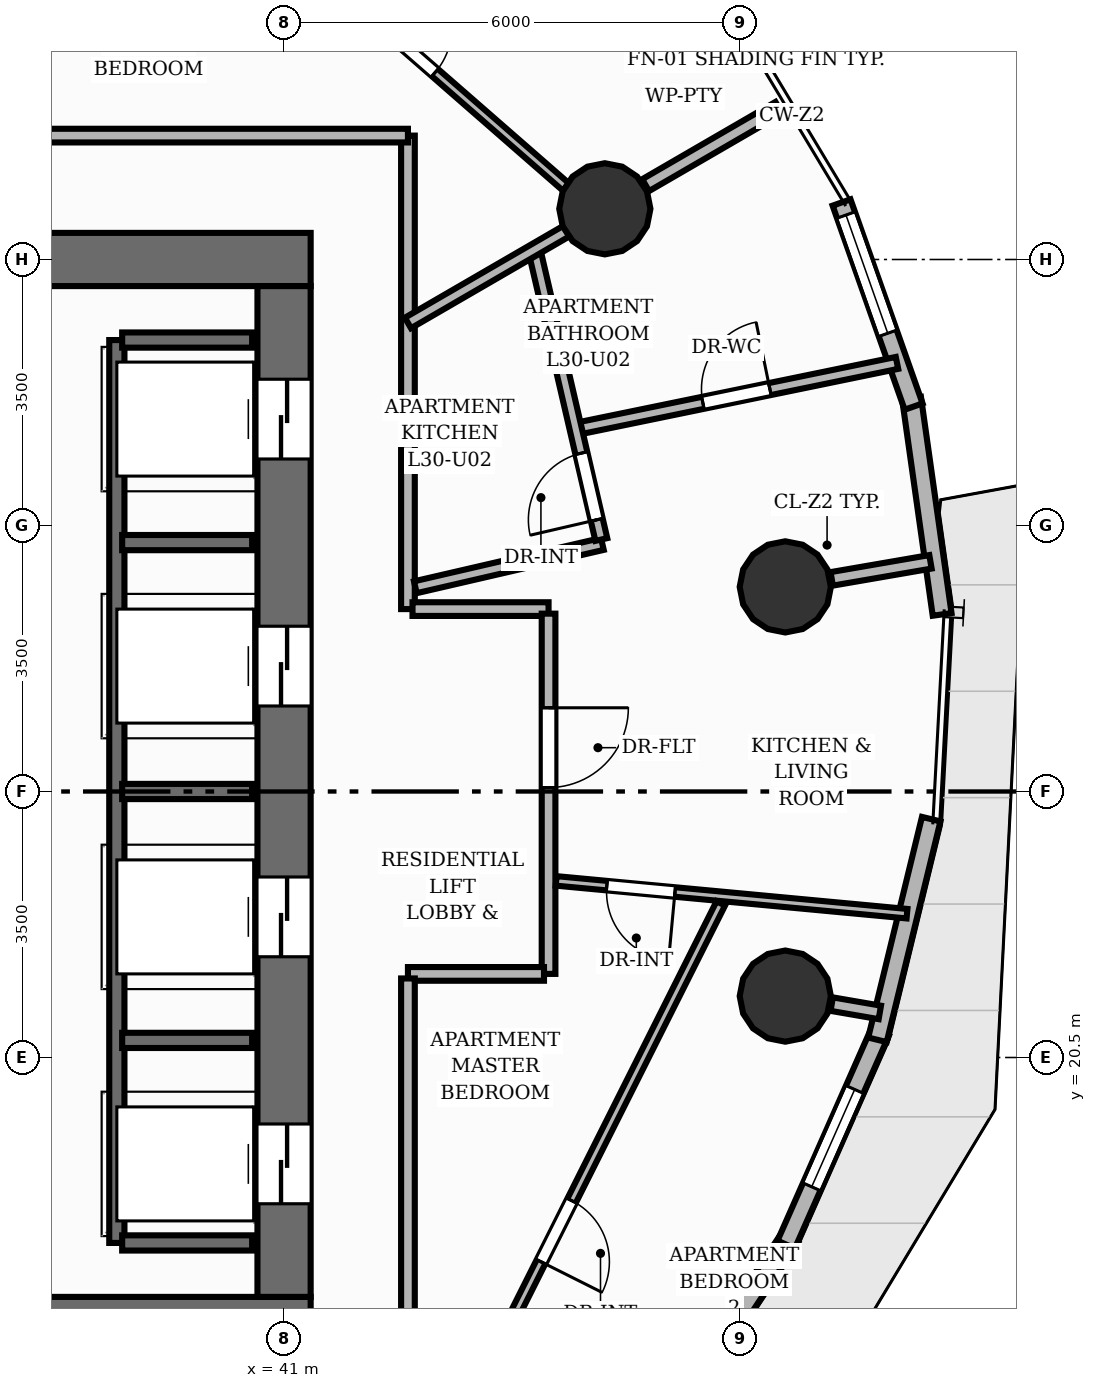
"""IFC4 building model, lengths in metres.
Left out: names, types, materials, properties, quantities, classifications, styles, units other than length and angle.
Written with IfcOpenShell. Run it as: python <this file> out.ifc"""

import sys

from ifc_helpers import new_model, si_unit, direction, frame, frame_2d, origin, origin_2d, place, context, subcontext, project, spatial, rectangle, circle, extrude, element, fill, save


model = new_model("IFC4")
c1 = context("Model", 3, precision=1e-05, world=origin(), true_north=direction((0.0, 1.0)))
c2 = subcontext(c1, "Body", "Model", "MODEL_VIEW")
j1 = project(units=[si_unit("LENGTHUNIT", "METRE"), si_unit("PLANEANGLEUNIT", "RADIAN")], contexts=[c1])
p1 = place(None, origin())
s1 = spatial("IfcSite", under=j1, at=p1, CompositionType="ELEMENT")
p2 = place(p1, origin())
s2 = spatial("IfcBuilding", under=s1, at=p2, CompositionType="ELEMENT")
p3 = place(p2, frame((0.0, 0.0, 102.88)))
s3 = spatial("IfcBuildingStorey", under=s2, at=p3, CompositionType="ELEMENT", Elevation=102.88)
p4 = place(p3, frame((22.65, 17.0, 0.0), z_axis=(0.0, 0.0, 1.0), x_axis=(1.0, 0.0, 0.0)))
e1 = element("IfcWall", 1, at=p4, inside=s3, PredefinedType="SHEAR", context=c2, shape_type="SweptSolid", body=[
    extrude(rectangle(XDim=18.7, YDim=0.7, at=frame_2d((9.35, 0.0))), origin(), (0.0, 0.0, 1.0), 3.2),
])
p5 = place(p4, frame((5.85, 0.0, 0.0)))
e2 = element("IfcOpeningElement", 2, at=p5, cuts=e1, PredefinedType="OPENING", context=c2, shape_type="SweptSolid", body=[
    extrude(rectangle(XDim=1.1, YDim=2.15, at=frame_2d((0.55, 1.075))), frame((0.0, 0.36, 0.0), z_axis=(0.0, -1.0, 0.0), x_axis=(1.0, 0.0, 0.0)), (0.0, 0.0, 1.0), 0.72),
])
p6 = place(p4, frame((9.4, 0.0, 0.0)))
e3 = element("IfcOpeningElement", 3, at=p6, cuts=e1, PredefinedType="OPENING", context=c2, shape_type="SweptSolid", body=[
    extrude(rectangle(XDim=0.9, YDim=2.1, at=frame_2d((0.45, 1.05))), frame((0.0, 0.36, 0.0), z_axis=(0.0, -1.0, 0.0), x_axis=(1.0, 0.0, 0.0)), (0.0, 0.0, 1.0), 0.72),
])
p7 = place(p3, frame((22.65, 31.0, 0.0), z_axis=(0.0, 0.0, 1.0), x_axis=(1.0, 0.0, 0.0)))
e4 = element("IfcWall", 4, at=p7, inside=s3, PredefinedType="SHEAR", context=c2, shape_type="SweptSolid", body=[
    extrude(rectangle(XDim=18.7, YDim=0.7, at=frame_2d((9.35, 0.0))), origin(), (0.0, 0.0, 1.0), 3.2),
])
p8 = place(p7, frame((11.75, 0.0, 0.0)))
e5 = element("IfcOpeningElement", 5, at=p8, cuts=e4, PredefinedType="OPENING", context=c2, shape_type="SweptSolid", body=[
    extrude(rectangle(XDim=1.1, YDim=2.15, at=frame_2d((0.55, 1.075))), frame((0.0, 0.36, 0.0), z_axis=(0.0, -1.0, 0.0), x_axis=(1.0, 0.0, 0.0)), (0.0, 0.0, 1.0), 0.72),
])
p9 = place(p3, frame((41.0, 17.35, 0.0), z_axis=(0.0, 0.0, 1.0), x_axis=(0.0, 1.0, 0.0)))
e6 = element("IfcWall", 6, at=p9, inside=s3, PredefinedType="SHEAR", context=c2, shape_type="SweptSolid", body=[
    extrude(rectangle(XDim=13.3, YDim=0.7, at=frame_2d((6.65, 0.0))), origin(), (0.0, 0.0, 1.0), 3.2),
])
p10 = place(p9, frame((1.225, 0.0, 0.0)))
e7 = element("IfcOpeningElement", 7, at=p10, cuts=e6, PredefinedType="OPENING", context=c2, shape_type="SweptSolid", body=[
    extrude(rectangle(XDim=1.05, YDim=2.15, at=frame_2d((0.525, 1.075))), frame((0.0, 0.36, 0.0), z_axis=(0.0, -1.0, 0.0), x_axis=(1.0, 0.0, 0.0)), (0.0, 0.0, 1.0), 0.72),
])
p11 = place(p9, frame((4.475, 0.0, 0.0)))
e8 = element("IfcOpeningElement", 8, at=p11, cuts=e6, PredefinedType="OPENING", context=c2, shape_type="SweptSolid", body=[
    extrude(rectangle(XDim=1.05, YDim=2.15, at=frame_2d((0.525, 1.075))), frame((0.0, 0.36, 0.0), z_axis=(0.0, -1.0, 0.0), x_axis=(1.0, 0.0, 0.0)), (0.0, 0.0, 1.0), 0.72),
])
p12 = place(p9, frame((7.775, 0.0, 0.0)))
e9 = element("IfcOpeningElement", 9, at=p12, cuts=e6, PredefinedType="OPENING", context=c2, shape_type="SweptSolid", body=[
    extrude(rectangle(XDim=1.05, YDim=2.15, at=frame_2d((0.525, 1.075))), frame((0.0, 0.36, 0.0), z_axis=(0.0, -1.0, 0.0), x_axis=(1.0, 0.0, 0.0)), (0.0, 0.0, 1.0), 0.72),
])
p13 = place(p9, frame((11.025, 0.0, 0.0)))
e10 = element("IfcOpeningElement", 10, at=p13, cuts=e6, PredefinedType="OPENING", context=c2, shape_type="SweptSolid", body=[
    extrude(rectangle(XDim=1.05, YDim=2.15, at=frame_2d((0.525, 1.075))), frame((0.0, 0.36, 0.0), z_axis=(0.0, -1.0, 0.0), x_axis=(1.0, 0.0, 0.0)), (0.0, 0.0, 1.0), 0.72),
])
for number, where, z_axis, x_axis in (
    (11, (47.594, 26.692, 0.0), (0.0, 0.0, 1.0), (1.0, 0.0, 0.0)),
    (12, (45.22, 31.667, 0.0), (0.0, 0.0, 1.0), (1.0, 0.0, 0.0)),
    (13, (47.594, 21.308, 0.0), (0.0, 0.0, 1.0), (1.0, 0.0, 0.0)),
):
    element("IfcColumn", number, at=place(p3, frame(where, z_axis=z_axis, x_axis=x_axis)), inside=s3, PredefinedType="COLUMN", context=c2, shape_type="SweptSolid", body=[
        extrude(circle(Radius=0.6, at=origin_2d()), origin(), (0.0, 0.0, 1.0), 3.2),
    ])
p14 = place(p3, frame((47.659, 18.136, 0.0), z_axis=(0.0, 0.0, 1.0), x_axis=(-0.552034347266, -0.833821371421, 0.0)))
e14 = element("IfcWall", 14, at=p14, inside=s3, PredefinedType="SOLIDWALL", context=c2, shape_type="SweptSolid", body=[
    extrude(rectangle(XDim=3.131, YDim=0.25, at=frame_2d((1.565, 0.0))), origin(), (0.0, 0.0, 1.0), 2.96),
])
p15 = place(p3, frame((48.843, 20.838, 0.0), z_axis=(0.0, 0.0, 1.0), x_axis=(-0.404109525311, -0.914710605357, 0.0)))
e15 = element("IfcWall", 15, at=p15, inside=s3, PredefinedType="SOLIDWALL", context=c2, shape_type="SweptSolid", body=[
    extrude(rectangle(XDim=3.061, YDim=0.25, at=frame_2d((1.53, 0.0))), origin(), (0.0, 0.0, 1.0), 2.96),
])
p16 = place(p15, frame((0.83, 0.0, 0.85)))
e16 = element("IfcOpeningElement", 16, at=p16, cuts=e15, PredefinedType="OPENING", context=c2, shape_type="SweptSolid", body=[
    extrude(rectangle(XDim=1.4, YDim=1.55, at=frame_2d((0.7, 0.775))), frame((0.0, 0.135, 0.0), z_axis=(0.0, -1.0, 0.0), x_axis=(1.0, 0.0, 0.0)), (0.0, 0.0, 1.0), 0.27),
])
p17 = place(p3, frame((49.514, 23.636, 0.0), z_axis=(0.0, 0.0, 1.0), x_axis=(-0.236668427837, -0.971590477138, 0.0)))
e17 = element("IfcWall", 17, at=p17, inside=s3, PredefinedType="SOLIDWALL", context=c2, shape_type="SweptSolid", body=[
    extrude(rectangle(XDim=2.989, YDim=0.25, at=frame_2d((1.494, 0.0))), origin(), (0.0, 0.0, 1.0), 2.96),
])
p18 = place(p3, frame((49.256, 29.176, 0.0), z_axis=(0.0, 0.0, 1.0), x_axis=(0.139982311006, -0.990154004489, 0.0)))
e18 = element("IfcWall", 18, at=p18, inside=s3, PredefinedType="SOLIDWALL", context=c2, shape_type="SweptSolid", body=[
    extrude(rectangle(XDim=2.874, YDim=0.25, at=frame_2d((1.437, 0.0))), origin(), (0.0, 0.0, 1.0), 2.96),
])
p19 = place(p3, frame((48.335, 31.75, 0.0), z_axis=(0.0, 0.0, 1.0), x_axis=(0.332923265962, -0.942953921982, 0.0)))
e19 = element("IfcWall", 19, at=p19, inside=s3, PredefinedType="SOLIDWALL", context=c2, shape_type="SweptSolid", body=[
    extrude(rectangle(XDim=2.847, YDim=0.25, at=frame_2d((1.424, 0.0))), origin(), (0.0, 0.0, 1.0), 2.96),
])
p20 = place(p19, frame((0.175, 0.0, 0.85)))
e20 = element("IfcOpeningElement", 20, at=p20, cuts=e19, PredefinedType="OPENING", context=c2, shape_type="SweptSolid", body=[
    extrude(rectangle(XDim=1.65, YDim=1.55, at=frame_2d((0.825, 0.775))), frame((0.0, 0.135, 0.0), z_axis=(0.0, -1.0, 0.0), x_axis=(1.0, 0.0, 0.0)), (0.0, 0.0, 1.0), 0.27),
])
p21 = place(p3, frame((38.8, 18.06, 0.0), z_axis=(0.0, 0.0, 1.0), x_axis=(0.0, 1.0, 0.0)))
e21 = element("IfcWall", 21, at=p21, inside=s3, PredefinedType="SHEAR", context=c2, shape_type="SweptSolid", body=[
    extrude(rectangle(XDim=11.88, YDim=0.2, at=frame_2d((5.94, 0.0))), origin(), (0.0, 0.0, 1.0), 3.2),
])
for number, where, z_axis, x_axis in (
    (22, (38.87, 18.06, 0.0), (0.0, 0.0, 1.0), (1.0, 0.0, 0.0)),
    (23, (38.87, 29.94, 0.0), (0.0, 0.0, 1.0), (1.0, 0.0, 0.0)),
    (24, (38.87, 20.725, 0.0), (0.0, 0.0, 1.0), (1.0, 0.0, 0.0)),
    (25, (38.87, 24.0, 0.0), (0.0, 0.0, 1.0), (1.0, 0.0, 0.0)),
    (26, (38.87, 27.275, 0.0), (0.0, 0.0, 1.0), (1.0, 0.0, 0.0)),
):
    element("IfcWall", number, at=place(p3, frame(where, z_axis=z_axis, x_axis=x_axis)), inside=s3, PredefinedType="SHEAR", context=c2, shape_type="SweptSolid", body=[
        extrude(rectangle(XDim=1.71, YDim=0.2, at=frame_2d((0.855, 0.0))), origin(), (0.0, 0.0, 1.0), 3.2),
    ])
p22 = place(p3, frame((48.206, 26.798, 0.0), z_axis=(0.0, 0.0, 1.0), x_axis=(0.98541625201, 0.170161130326, 0.0)))
e27 = element("IfcWall", 27, at=p22, inside=s3, PredefinedType="PARTITIONING", context=c2, shape_type="SweptSolid", body=[
    extrude(rectangle(XDim=1.319, YDim=0.18, at=frame_2d((0.659, 0.0))), origin(), (0.0, 0.0, 1.0), 2.261),
])
p23 = place(p3, frame((45.757, 31.978, 0.0), z_axis=(0.0, 0.0, 1.0), x_axis=(0.865046864493, 0.501691062539, 0.0)))
e28 = element("IfcWall", 28, at=p23, inside=s3, PredefinedType="PARTITIONING", context=c2, shape_type="SweptSolid", body=[
    extrude(rectangle(XDim=2.028, YDim=0.18, at=frame_2d((1.014, 0.0))), origin(), (0.0, 0.0, 1.0), 2.261),
])
p24 = place(p3, frame((48.206, 21.202, 0.0), z_axis=(0.0, 0.0, 1.0), x_axis=(0.985389793052, -0.170314285219, 0.0)))
e29 = element("IfcWall", 29, at=p24, inside=s3, PredefinedType="PARTITIONING", context=c2, shape_type="SweptSolid", body=[
    extrude(rectangle(XDim=0.642, YDim=0.18, at=frame_2d((0.321, 0.0))), origin(), (0.0, 0.0, 1.0), 2.261),
])
p25 = place(p3, frame((42.63, 32.63, 0.0), z_axis=(0.0, 0.0, 1.0), x_axis=(0.0, -1.0, 0.0)))
e30 = element("IfcWall", 30, at=p25, inside=s3, PredefinedType="PARTITIONING", context=c2, shape_type="SweptSolid", body=[
    extrude(rectangle(XDim=6.23, YDim=0.18, at=frame_2d((3.115, 0.0))), origin(), (0.0, 0.0, 1.0), 2.955),
])
p26 = place(p3, frame((42.69, 26.4, 0.0), z_axis=(0.0, 0.0, 1.0), x_axis=(1.0, 0.0, 0.0)))
e31 = element("IfcWall", 31, at=p26, inside=s3, PredefinedType="PARTITIONING", context=c2, shape_type="SweptSolid", body=[
    extrude(rectangle(XDim=1.79, YDim=0.18, at=frame_2d((0.895, 0.0))), origin(), (0.0, 0.0, 1.0), 2.261),
])
p27 = place(p3, frame((44.48, 26.34, 0.0), z_axis=(0.0, 0.0, 1.0), x_axis=(0.0, -1.0, 0.0)))
e32 = element("IfcWall", 32, at=p27, inside=s3, PredefinedType="PARTITIONING", context=c2, shape_type="SweptSolid", body=[
    extrude(rectangle(XDim=4.74, YDim=0.18, at=frame_2d((2.37, 0.0))), origin(), (0.0, 0.0, 1.0), 2.955),
])
p28 = place(p27, frame((1.239, 0.0, 0.0)))
e33 = element("IfcOpeningElement", 33, at=p28, cuts=e32, PredefinedType="OPENING", context=c2, shape_type="SweptSolid", body=[
    extrude(rectangle(XDim=1.05, YDim=2.15, at=frame_2d((0.525, 1.075))), frame((0.0, 0.1, 0.0), z_axis=(0.0, -1.0, 0.0), x_axis=(1.0, 0.0, 0.0)), (0.0, 0.0, 1.0), 0.2),
])
p29 = place(p3, frame((44.42, 21.6, 0.0), z_axis=(0.0, 0.0, 1.0), x_axis=(-1.0, 0.0, 0.0)))
e34 = element("IfcWall", 34, at=p29, inside=s3, PredefinedType="PARTITIONING", context=c2, shape_type="SweptSolid", body=[
    extrude(rectangle(XDim=1.79, YDim=0.18, at=frame_2d((0.895, 0.0))), origin(), (0.0, 0.0, 1.0), 2.261),
])
p30 = place(p3, frame((42.63, 21.54, 0.0), z_axis=(0.0, 0.0, 1.0), x_axis=(0.0, -1.0, 0.0)))
e35 = element("IfcWall", 35, at=p30, inside=s3, PredefinedType="PARTITIONING", context=c2, shape_type="SweptSolid", body=[
    extrude(rectangle(XDim=6.17, YDim=0.18, at=frame_2d((3.085, 0.0))), origin(), (0.0, 0.0, 1.0), 2.955),
])
p31 = place(p3, frame((22.734, 32.63, 0.0), z_axis=(0.0, 0.0, 1.0), x_axis=(1.0, 0.0, 0.0)))
e36 = element("IfcWall", 36, at=p31, inside=s3, PredefinedType="PARTITIONING", context=c2, shape_type="SweptSolid", body=[
    extrude(rectangle(XDim=19.896, YDim=0.18, at=frame_2d((9.948, 0.0))), origin(), (0.0, 0.0, 1.0), 2.955),
])
p32 = place(p31, frame((11.004, 0.0, 0.0)))
e37 = element("IfcOpeningElement", 37, at=p32, cuts=e36, PredefinedType="OPENING", context=c2, shape_type="SweptSolid", body=[
    extrude(rectangle(XDim=1.05, YDim=2.15, at=frame_2d((0.525, 1.075))), frame((0.0, 0.1, 0.0), z_axis=(0.0, -1.0, 0.0), x_axis=(1.0, 0.0, 0.0)), (0.0, 0.0, 1.0), 0.2),
])
p33 = place(p3, frame((44.838, 28.77, 0.0), z_axis=(0.0, 0.0, 1.0), x_axis=(0.97949547816, 0.201466146695, 0.0)))
e38 = element("IfcWall", 38, at=p33, inside=s3, PredefinedType="PLUMBINGWALL", context=c2, shape_type="SweptSolid", body=[
    extrude(rectangle(XDim=4.315, YDim=0.16, at=frame_2d((2.158, 0.0))), origin(), (0.0, 0.0, 1.0), 2.955),
])
p34 = place(p33, frame((1.708, 0.0, 0.0)))
e39 = element("IfcOpeningElement", 39, at=p34, cuts=e38, PredefinedType="OPENING", context=c2, shape_type="SweptSolid", body=[
    extrude(rectangle(XDim=0.9, YDim=2.1, at=frame_2d((0.45, 1.05))), frame((0.0, 0.09, 0.0), z_axis=(0.0, -1.0, 0.0), x_axis=(1.0, 0.0, 0.0)), (0.0, 0.0, 1.0), 0.18),
])
p35 = place(p3, frame((49.196, 22.392, 0.0), z_axis=(0.0, 0.0, 1.0), x_axis=(-0.99565683003, 0.09309928472, 0.0)))
e40 = element("IfcWall", 40, at=p35, inside=s3, PredefinedType="PARTITIONING", context=c2, shape_type="SweptSolid", body=[
    extrude(rectangle(XDim=4.636, YDim=0.125, at=frame_2d((2.318, 0.0))), origin(), (0.0, 0.0, 1.0), 2.955),
])
p36 = place(p35, frame((3.066, 0.0, 0.0)))
e41 = element("IfcOpeningElement", 41, at=p36, cuts=e40, PredefinedType="OPENING", context=c2, shape_type="SweptSolid", body=[
    extrude(rectangle(XDim=0.9, YDim=2.1, at=frame_2d((0.45, 1.05))), frame((0.0, 0.073, 0.0), z_axis=(0.0, -1.0, 0.0), x_axis=(1.0, 0.0, 0.0)), (0.0, 0.0, 1.0), 0.145),
])
p37 = place(p3, frame((42.727, 26.688, 0.0), z_axis=(0.0, 0.0, 1.0), x_axis=(0.974262333638, 0.225417180479, 0.0)))
e42 = element("IfcWall", 42, at=p37, inside=s3, PredefinedType="PLUMBINGWALL", context=c2, shape_type="SweptSolid", body=[
    extrude(rectangle(XDim=2.526, YDim=0.16, at=frame_2d((1.263, 0.0))), origin(), (0.0, 0.0, 1.0), 2.955),
])
p38 = place(p3, frame((45.174, 27.315, 0.0), z_axis=(0.0, 0.0, 1.0), x_axis=(-0.225561032487, 0.974229039099, 0.0)))
e43 = element("IfcWall", 43, at=p38, inside=s3, PredefinedType="PLUMBINGWALL", context=c2, shape_type="SweptSolid", body=[
    extrude(rectangle(XDim=3.914, YDim=0.16, at=frame_2d((1.957, 0.0))), origin(), (0.0, 0.0, 1.0), 2.955),
])
p39 = place(p38, frame((0.266, 0.0, 0.0)))
e44 = element("IfcOpeningElement", 44, at=p39, cuts=e43, PredefinedType="OPENING", context=c2, shape_type="SweptSolid", body=[
    extrude(rectangle(XDim=0.9, YDim=2.1, at=frame_2d((0.45, 1.05))), frame((0.0, 0.09, 0.0), z_axis=(0.0, -1.0, 0.0), x_axis=(1.0, 0.0, 0.0)), (0.0, 0.0, 1.0), 0.18),
])
p40 = place(p3, frame((42.63, 30.165, 0.0), z_axis=(0.0, 0.0, 1.0), x_axis=(0.865092804374, 0.501611841786, 0.0)))
e45 = element("IfcWall", 45, at=p40, inside=s3, PredefinedType="PLUMBINGWALL", context=c2, shape_type="SweptSolid", body=[
    extrude(rectangle(XDim=2.407, YDim=0.16, at=frame_2d((1.204, 0.0))), origin(), (0.0, 0.0, 1.0), 2.261),
])
p41 = place(p3, frame((46.746, 22.528, 0.0), z_axis=(0.0, 0.0, 1.0), x_axis=(-0.448357094434, -0.893854527242, 0.0)))
e46 = element("IfcWall", 46, at=p41, inside=s3, PredefinedType="PARTITIONING", context=c2, shape_type="SweptSolid", body=[
    extrude(rectangle(XDim=11.611, YDim=0.125, at=frame_2d((5.805, 0.0))), origin(), (0.0, 0.0, 1.0), 2.404),
])
p42 = place(p41, frame((4.375, 0.0, 0.0)))
e47 = element("IfcOpeningElement", 47, at=p42, cuts=e46, PredefinedType="OPENING", context=c2, shape_type="SweptSolid", body=[
    extrude(rectangle(XDim=0.9, YDim=2.1, at=frame_2d((0.45, 1.05))), frame((0.0, 0.073, 0.0), z_axis=(0.0, -1.0, 0.0), x_axis=(1.0, 0.0, 0.0)), (0.0, 0.0, 1.0), 0.145),
])
p43 = place(p3, frame((38.091, 37.756, 0.0), z_axis=(0.0, 0.0, 1.0), x_axis=(-0.404874602407, -0.914372219791, 0.0)))
e48 = element("IfcWall", 48, at=p43, inside=s3, PredefinedType="PARTITIONING", context=c2, shape_type="SweptSolid", body=[
    extrude(rectangle(XDim=5.486, YDim=0.125, at=frame_2d((2.743, 0.0))), origin(), (0.0, 0.0, 1.0), 2.955),
])
p44 = place(p43, frame((2.293, 0.0, 0.0)))
e49 = element("IfcOpeningElement", 49, at=p44, cuts=e48, PredefinedType="OPENING", context=c2, shape_type="SweptSolid", body=[
    extrude(rectangle(XDim=0.9, YDim=2.1, at=frame_2d((0.45, 1.05))), frame((0.0, 0.073, 0.0), z_axis=(0.0, -1.0, 0.0), x_axis=(1.0, 0.0, 0.0)), (0.0, 0.0, 1.0), 0.145),
])
p45 = place(p3, frame((41.216, 35.003, 0.0), z_axis=(0.0, 0.0, 1.0), x_axis=(0.753372011099, -0.657594565741, 0.0)))
e50 = element("IfcWall", 50, at=p45, inside=s3, PredefinedType="PARTITIONING", context=c2, shape_type="SweptSolid", body=[
    extrude(rectangle(XDim=4.637, YDim=0.125, at=frame_2d((2.318, 0.0))), origin(), (0.0, 0.0, 1.0), 2.404),
])
p46 = place(p45, frame((1.448, 0.0, 0.0)))
e51 = element("IfcOpeningElement", 51, at=p46, cuts=e50, PredefinedType="OPENING", context=c2, shape_type="SweptSolid", body=[
    extrude(rectangle(XDim=0.9, YDim=2.1, at=frame_2d((0.45, 1.05))), frame((0.0, 0.073, 0.0), z_axis=(0.0, -1.0, 0.0), x_axis=(1.0, 0.0, 0.0)), (0.0, 0.0, 1.0), 0.145),
])
p47 = place(p16, origin())
e52 = element("IfcWindow", 52, at=p47, inside=s3, PartitioningType="SINGLE_PANEL", PredefinedType="WINDOW", context=c2, shape_type="SweptSolid", body=[
    extrude(rectangle(XDim=1.4, YDim=1.55, at=frame_2d((0.7, 0.775))), frame((0.0, 0.03, 0.0), z_axis=(0.0, -1.0, 0.0), x_axis=(1.0, 0.0, 0.0)), (0.0, 0.0, 1.0), 0.06),
])
fill(e16, e52)
p48 = place(p20, origin())
e53 = element("IfcWindow", 53, at=p48, inside=s3, PartitioningType="SINGLE_PANEL", PredefinedType="WINDOW", context=c2, shape_type="SweptSolid", body=[
    extrude(rectangle(XDim=1.65, YDim=1.55, at=frame_2d((0.825, 0.775))), frame((0.0, 0.03, 0.0), z_axis=(0.0, -1.0, 0.0), x_axis=(1.0, 0.0, 0.0)), (0.0, 0.0, 1.0), 0.06),
])
fill(e20, e53)
p49 = place(p10, origin())
e54 = element("IfcDoor", 54, at=p49, inside=s3, OperationType="DOUBLE_DOOR_SLIDING", PredefinedType="DOOR", context=c2, shape_type="SweptSolid", body=[
    extrude(rectangle(XDim=1.05, YDim=2.15, at=frame_2d((0.525, 1.075))), frame((0.0, 0.025, 0.0), z_axis=(0.0, -1.0, 0.0), x_axis=(1.0, 0.0, 0.0)), (0.0, 0.0, 1.0), 0.05),
])
fill(e7, e54)
p50 = place(p11, origin())
e55 = element("IfcDoor", 55, at=p50, inside=s3, OperationType="DOUBLE_DOOR_SLIDING", PredefinedType="DOOR", context=c2, shape_type="SweptSolid", body=[
    extrude(rectangle(XDim=1.05, YDim=2.15, at=frame_2d((0.525, 1.075))), frame((0.0, 0.025, 0.0), z_axis=(0.0, -1.0, 0.0), x_axis=(1.0, 0.0, 0.0)), (0.0, 0.0, 1.0), 0.05),
])
fill(e8, e55)
p51 = place(p12, origin())
e56 = element("IfcDoor", 56, at=p51, inside=s3, OperationType="DOUBLE_DOOR_SLIDING", PredefinedType="DOOR", context=c2, shape_type="SweptSolid", body=[
    extrude(rectangle(XDim=1.05, YDim=2.15, at=frame_2d((0.525, 1.075))), frame((0.0, 0.025, 0.0), z_axis=(0.0, -1.0, 0.0), x_axis=(1.0, 0.0, 0.0)), (0.0, 0.0, 1.0), 0.05),
])
fill(e9, e56)
p52 = place(p13, origin())
e57 = element("IfcDoor", 57, at=p52, inside=s3, OperationType="DOUBLE_DOOR_SLIDING", PredefinedType="DOOR", context=c2, shape_type="SweptSolid", body=[
    extrude(rectangle(XDim=1.05, YDim=2.15, at=frame_2d((0.525, 1.075))), frame((0.0, 0.025, 0.0), z_axis=(0.0, -1.0, 0.0), x_axis=(1.0, 0.0, 0.0)), (0.0, 0.0, 1.0), 0.05),
])
fill(e10, e57)
p53 = place(p28, origin())
e58 = element("IfcDoor", 58, at=p53, inside=s3, OperationType="SINGLE_SWING_LEFT", PredefinedType="DOOR", context=c2, shape_type="SweptSolid", body=[
    extrude(rectangle(XDim=1.05, YDim=2.15, at=frame_2d((0.525, 1.075))), frame((0.0, 0.025, 0.0), z_axis=(0.0, -1.0, 0.0), x_axis=(1.0, 0.0, 0.0)), (0.0, 0.0, 1.0), 0.05),
])
fill(e33, e58)
p54 = place(p34, origin())
e59 = element("IfcDoor", 59, at=p54, inside=s3, OperationType="SINGLE_SWING_RIGHT", PredefinedType="DOOR", context=c2, shape_type="SweptSolid", body=[
    extrude(rectangle(XDim=0.9, YDim=2.1, at=frame_2d((0.45, 1.05))), frame((0.0, 0.025, 0.0), z_axis=(0.0, -1.0, 0.0), x_axis=(1.0, 0.0, 0.0)), (0.0, 0.0, 1.0), 0.05),
])
fill(e39, e59)
p55 = place(p36, origin())
e60 = element("IfcDoor", 60, at=p55, inside=s3, OperationType="SINGLE_SWING_LEFT", PredefinedType="DOOR", context=c2, shape_type="SweptSolid", body=[
    extrude(rectangle(XDim=0.9, YDim=2.1, at=frame_2d((0.45, 1.05))), frame((0.0, 0.025, 0.0), z_axis=(0.0, -1.0, 0.0), x_axis=(1.0, 0.0, 0.0)), (0.0, 0.0, 1.0), 0.05),
])
fill(e41, e60)
p56 = place(p42, origin())
e61 = element("IfcDoor", 61, at=p56, inside=s3, OperationType="SINGLE_SWING_RIGHT", PredefinedType="DOOR", context=c2, shape_type="SweptSolid", body=[
    extrude(rectangle(XDim=0.9, YDim=2.1, at=frame_2d((0.45, 1.05))), frame((0.0, 0.025, 0.0), z_axis=(0.0, -1.0, 0.0), x_axis=(1.0, 0.0, 0.0)), (0.0, 0.0, 1.0), 0.05),
])
fill(e47, e61)
p57 = place(p39, origin())
e62 = element("IfcDoor", 62, at=p57, inside=s3, OperationType="SINGLE_SWING_LEFT", PredefinedType="DOOR", context=c2, shape_type="SweptSolid", body=[
    extrude(rectangle(XDim=0.9, YDim=2.1, at=frame_2d((0.45, 1.05))), frame((0.0, 0.025, 0.0), z_axis=(0.0, -1.0, 0.0), x_axis=(1.0, 0.0, 0.0)), (0.0, 0.0, 1.0), 0.05),
])
fill(e44, e62)
p58 = place(p46, origin())
e63 = element("IfcDoor", 63, at=p58, inside=s3, OperationType="SINGLE_SWING_LEFT", PredefinedType="DOOR", context=c2, shape_type="SweptSolid", body=[
    extrude(rectangle(XDim=0.9, YDim=2.1, at=frame_2d((0.45, 1.05))), frame((0.0, 0.025, 0.0), z_axis=(0.0, -1.0, 0.0), x_axis=(1.0, 0.0, 0.0)), (0.0, 0.0, 1.0), 0.05),
])
fill(e51, e63)
save(model, sys.argv[1])
